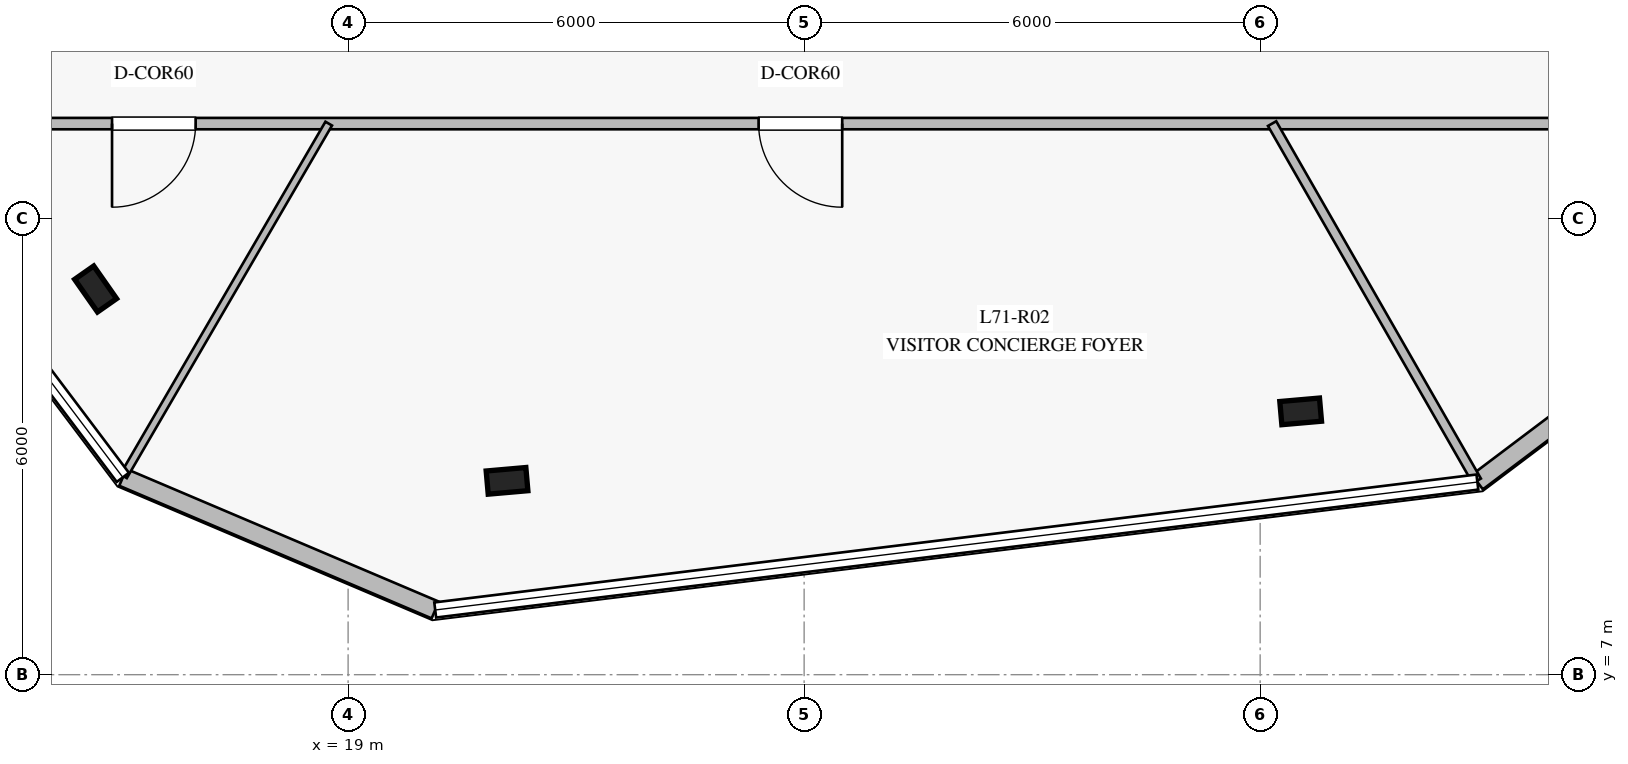
"""IFC4 building model, lengths in metres.
Left out: names, types, materials, properties, quantities, classifications, styles, units other than length and angle.
Written with IfcOpenShell. Run it as: python <this file> out.ifc"""

import sys

from ifc_helpers import new_model, si_unit, direction, frame, frame_2d, origin, origin_2d, place, context, subcontext, project, spatial, rectangle, i_section, extrude, element, fill, save


model = new_model("IFC4")
c1 = context("Model", 3, precision=1e-05, world=origin(), true_north=direction((0.0, 1.0)))
c2 = subcontext(c1, "Body", "Model", "MODEL_VIEW")
j1 = project(units=[si_unit("LENGTHUNIT", "METRE"), si_unit("PLANEANGLEUNIT", "RADIAN")], contexts=[c1])
p1 = place(None, origin())
s1 = spatial("IfcSite", under=j1, at=p1, CompositionType="ELEMENT")
p2 = place(p1, origin())
s2 = spatial("IfcBuilding", under=s1, at=p2, CompositionType="ELEMENT")
p3 = place(p2, frame((0.0, 0.0, 294.2)))
s3 = spatial("IfcBuildingStorey", under=s2, at=p3, CompositionType="ELEMENT", Elevation=294.2)
for number, where, z_axis, x_axis in (
    (1, (15.678, 12.074, 0.0), (0.0, 0.0, 1.0), (-0.574, 0.819, 0.0)),
    (2, (21.091, 9.55, 0.0), (0.0, 0.0, 1.0), (0.996, 0.087, 0.0)),
    (3, (31.533, 10.464, 0.0), (0.0, 0.0, 1.0), (0.996, 0.087, 0.0)),
):
    element("IfcColumn", number, at=place(p3, frame(where, z_axis=z_axis, x_axis=x_axis)), inside=s3, PredefinedType="COLUMN", context=c2, shape_type="SweptSolid", body=[
        extrude(i_section(OverallWidth=0.306, OverallDepth=0.524, WebThickness=0.021, FlangeThickness=0.04, at=origin_2d()), origin(), (0.0, 0.0, 1.0), 4.0),
    ])
p4 = place(p3, frame((16.036, 9.596, 0.0), z_axis=(0.0, 0.0, 1.0), x_axis=(0.92048584613, -0.390775903908, 0.0)))
e4 = element("IfcWall", 4, at=p4, inside=s3, PredefinedType="STANDARD", context=c2, shape_type="SweptSolid", body=[
    extrude(rectangle(XDim=4.465, YDim=0.24, at=frame_2d((2.232, 0.0))), origin(), (0.0, 0.0, 1.0), 3.78),
])
p5 = place(p3, frame((33.858, 9.534, 0.0), z_axis=(0.0, 0.0, 1.0), x_axis=(0.798560985543, 0.601913907772, 0.0)))
e5 = element("IfcWall", 5, at=p5, inside=s3, PredefinedType="STANDARD", context=c2, shape_type="SweptSolid", body=[
    extrude(rectangle(XDim=4.466, YDim=0.24, at=frame_2d((2.233, 0.0))), origin(), (0.0, 0.0, 1.0), 3.78),
])
p6 = place(p3, frame((36.35, 14.25, 0.0), z_axis=(0.0, 0.0, 1.0), x_axis=(-1.0, 0.0, 0.0)))
e6 = element("IfcWall", 6, at=p6, inside=s3, PredefinedType="PARTITIONING", context=c2, shape_type="SweptSolid", body=[
    extrude(rectangle(XDim=22.7, YDim=0.15, at=frame_2d((11.35, 0.0))), origin(), (0.0, 0.0, 1.0), 3.28),
])
p7 = place(p6, frame((19.356, 0.0, 0.0)))
e7 = element("IfcOpeningElement", 7, at=p7, cuts=e6, PredefinedType="OPENING", context=c2, shape_type="SweptSolid", body=[
    extrude(rectangle(XDim=1.1, YDim=2.2, at=frame_2d((0.55, 1.1))), frame((0.0, 0.085, 0.0), z_axis=(0.0, -1.0, 0.0), x_axis=(1.0, 0.0, 0.0)), (0.0, 0.0, 1.0), 0.17),
])
p8 = place(p6, frame((10.849, 0.0, 0.0)))
e8 = element("IfcOpeningElement", 8, at=p8, cuts=e6, PredefinedType="OPENING", context=c2, shape_type="SweptSolid", body=[
    extrude(rectangle(XDim=1.1, YDim=2.2, at=frame_2d((0.55, 1.1))), frame((0.0, 0.085, 0.0), z_axis=(0.0, -1.0, 0.0), x_axis=(1.0, 0.0, 0.0)), (0.0, 0.0, 1.0), 0.17),
])
p9 = place(p3, frame((18.745, 14.25, 0.0), z_axis=(0.0, 0.0, 1.0), x_axis=(-0.50305915127, -0.864251983118, 0.0)))
e9 = element("IfcWall", 9, at=p9, inside=s3, PredefinedType="MOVABLE", context=c2, shape_type="SweptSolid", body=[
    extrude(rectangle(XDim=5.367, YDim=0.1, at=frame_2d((2.684, 0.0))), origin(), (0.0, 0.0, 1.0), 3.28),
])
p10 = place(p3, frame((31.157, 14.25, 0.0), z_axis=(0.0, 0.0, 1.0), x_axis=(0.497094675542, -0.867696308364, 0.0)))
e10 = element("IfcWall", 10, at=p10, inside=s3, PredefinedType="PARTITIONING", context=c2, shape_type="SweptSolid", body=[
    extrude(rectangle(XDim=5.418, YDim=0.125, at=frame_2d((2.709, 0.0))), origin(), (0.0, 0.0, 1.0), 3.28),
])
p11 = place(p7, origin())
e11 = element("IfcDoor", 11, at=p11, inside=s3, OperationType="SINGLE_SWING_RIGHT", PredefinedType="DOOR", context=c2, shape_type="SweptSolid", body=[
    extrude(rectangle(XDim=1.1, YDim=2.2, at=frame_2d((0.55, 1.1))), frame((0.0, 0.025, 0.0), z_axis=(0.0, -1.0, 0.0), x_axis=(1.0, 0.0, 0.0)), (0.0, 0.0, 1.0), 0.05),
])
fill(e7, e11)
p12 = place(p8, origin())
e12 = element("IfcDoor", 12, at=p12, inside=s3, OperationType="SINGLE_SWING_LEFT", PredefinedType="DOOR", context=c2, shape_type="SweptSolid", body=[
    extrude(rectangle(XDim=1.1, YDim=2.2, at=frame_2d((0.55, 1.1))), frame((0.0, 0.025, 0.0), z_axis=(0.0, -1.0, 0.0), x_axis=(1.0, 0.0, 0.0)), (0.0, 0.0, 1.0), 0.05),
])
fill(e8, e12)
save(model, sys.argv[1])
